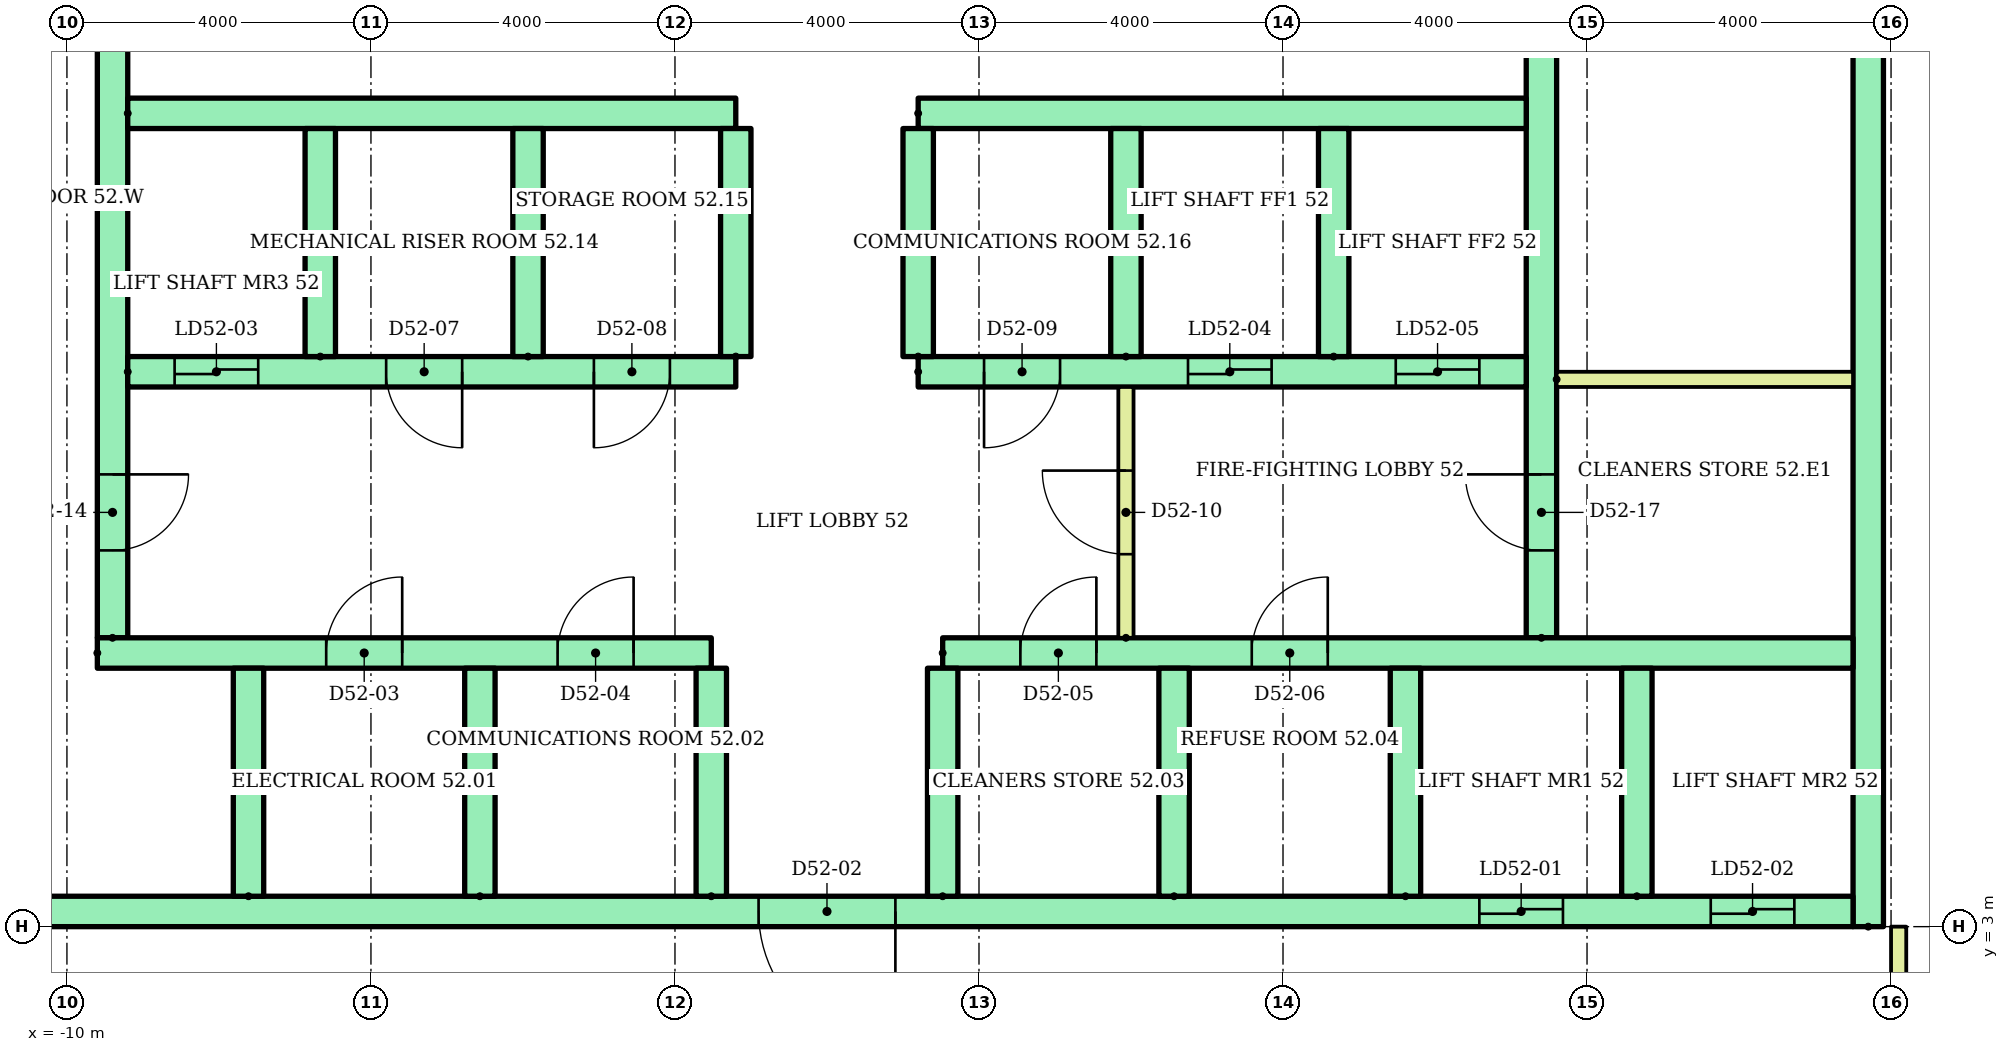
"""IFC4 building model, lengths in metres.
Left out: names, types, materials, properties, quantities, classifications, styles, units other than length and angle.
Written with IfcOpenShell. Run it as: python <this file> out.ifc"""

import sys

from ifc_helpers import new_model, si_unit, direction, frame, frame_2d, origin, place, context, subcontext, project, spatial, rectangle, extrude, element, fill, save


model = new_model("IFC4")
c1 = context("Model", 3, precision=1e-05, world=origin(), true_north=direction((0.0, 1.0)))
c2 = subcontext(c1, "Body", "Model", "MODEL_VIEW")
j1 = project(units=[si_unit("LENGTHUNIT", "METRE"), si_unit("PLANEANGLEUNIT", "RADIAN")], contexts=[c1])
p1 = place(None, origin())
s1 = spatial("IfcSite", under=j1, at=p1, CompositionType="ELEMENT")
p2 = place(p1, origin())
s2 = spatial("IfcBuilding", under=s1, at=p2, CompositionType="ELEMENT")
p3 = place(p2, frame((0.0, 0.0, 203.7)))
s3 = spatial("IfcBuildingStorey", under=s2, at=p3, CompositionType="ELEMENT", Elevation=203.7)
p4 = place(p3, frame((13.7, 3.0, 0.0), z_axis=(0.0, 0.0, 1.0), x_axis=(0.0, 1.0, 0.0)))
e1 = element("IfcWall", 1, at=p4, inside=s3, PredefinedType="SHEAR", context=c2, shape_type="SweptSolid", body=[
    extrude(rectangle(XDim=17.0, YDim=0.4, at=frame_2d((8.5, 0.0))), origin(), (0.0, 0.0, 1.0), 3.62),
])
p5 = place(p3, frame((-9.4, 6.8, 0.0), z_axis=(0.0, 0.0, 1.0), x_axis=(0.0, 1.0, 0.0)))
e2 = element("IfcWall", 2, at=p5, inside=s3, PredefinedType="SHEAR", context=c2, shape_type="SweptSolid", body=[
    extrude(rectangle(XDim=12.7, YDim=0.4, at=frame_2d((6.35, 0.0))), origin(), (0.0, 0.0, 1.0), 3.62),
])
p6 = place(p5, frame((1.15, 0.0, 0.0)))
e3 = element("IfcOpeningElement", 3, at=p6, cuts=e2, PredefinedType="OPENING", context=c2, shape_type="SweptSolid", body=[
    extrude(rectangle(XDim=1.0, YDim=2.1, at=frame_2d((0.5, 1.05))), frame((0.0, 0.21, 0.0), z_axis=(0.0, -1.0, 0.0), x_axis=(1.0, 0.0, 0.0)), (0.0, 0.0, 1.0), 0.42),
])
p7 = place(p5, frame((7.9, 0.0, 0.0)))
e4 = element("IfcOpeningElement", 4, at=p7, cuts=e2, PredefinedType="OPENING", context=c2, shape_type="SweptSolid", body=[
    extrude(rectangle(XDim=1.0, YDim=2.1, at=frame_2d((0.5, 1.05))), frame((0.0, 0.21, 0.0), z_axis=(0.0, -1.0, 0.0), x_axis=(1.0, 0.0, 0.0)), (0.0, 0.0, 1.0), 0.42),
])
p8 = place(p3, frame((9.4, 6.8, 0.0), z_axis=(0.0, 0.0, 1.0), x_axis=(0.0, 1.0, 0.0)))
e5 = element("IfcWall", 5, at=p8, inside=s3, PredefinedType="SHEAR", context=c2, shape_type="SweptSolid", body=[
    extrude(rectangle(XDim=12.7, YDim=0.4, at=frame_2d((6.35, 0.0))), origin(), (0.0, 0.0, 1.0), 3.62),
])
p9 = place(p8, frame((1.15, 0.0, 0.0)))
e6 = element("IfcOpeningElement", 6, at=p9, cuts=e5, PredefinedType="OPENING", context=c2, shape_type="SweptSolid", body=[
    extrude(rectangle(XDim=1.0, YDim=2.1, at=frame_2d((0.5, 1.05))), frame((0.0, 0.21, 0.0), z_axis=(0.0, -1.0, 0.0), x_axis=(1.0, 0.0, 0.0)), (0.0, 0.0, 1.0), 0.42),
])
p10 = place(p8, frame((7.925, 0.0, 0.0)))
e7 = element("IfcOpeningElement", 7, at=p10, cuts=e5, PredefinedType="OPENING", context=c2, shape_type="SweptSolid", body=[
    extrude(rectangle(XDim=1.0, YDim=2.1, at=frame_2d((0.5, 1.05))), frame((0.0, 0.21, 0.0), z_axis=(0.0, -1.0, 0.0), x_axis=(1.0, 0.0, 0.0)), (0.0, 0.0, 1.0), 0.42),
])
p11 = place(p3, frame((-13.5, 3.2, 0.0)))
e8 = element("IfcWall", 8, at=p11, inside=s3, PredefinedType="SHEAR", context=c2, shape_type="SweptSolid", body=[
    extrude(rectangle(XDim=27.0, YDim=0.4, at=frame_2d((13.5, 0.0))), origin(), (0.0, 0.0, 1.0), 3.62),
])
p12 = place(p11, frame((22.083, 0.0, 0.0)))
e9 = element("IfcOpeningElement", 9, at=p12, cuts=e8, PredefinedType="OPENING", context=c2, shape_type="SweptSolid", body=[
    extrude(rectangle(XDim=1.1, YDim=2.1, at=frame_2d((0.55, 1.05))), frame((0.0, 0.21, 0.0), z_axis=(0.0, -1.0, 0.0), x_axis=(1.0, 0.0, 0.0)), (0.0, 0.0, 1.0), 0.42),
])
p13 = place(p11, frame((25.128, 0.0, 0.0)))
e10 = element("IfcOpeningElement", 10, at=p13, cuts=e8, PredefinedType="OPENING", context=c2, shape_type="SweptSolid", body=[
    extrude(rectangle(XDim=1.1, YDim=2.1, at=frame_2d((0.55, 1.05))), frame((0.0, 0.21, 0.0), z_axis=(0.0, -1.0, 0.0), x_axis=(1.0, 0.0, 0.0)), (0.0, 0.0, 1.0), 0.42),
])
p14 = place(p11, frame((12.6, 0.0, 0.0)))
e11 = element("IfcOpeningElement", 11, at=p14, cuts=e8, PredefinedType="OPENING", context=c2, shape_type="SweptSolid", body=[
    extrude(rectangle(XDim=1.8, YDim=2.1, at=frame_2d((0.9, 1.05))), frame((0.0, 0.21, 0.0), z_axis=(0.0, -1.0, 0.0), x_axis=(1.0, 0.0, 0.0)), (0.0, 0.0, 1.0), 0.42),
])
p15 = place(p3, frame((-9.6, 6.6, 0.0)))
e12 = element("IfcWall", 12, at=p15, inside=s3, PredefinedType="SHEAR", context=c2, shape_type="SweptSolid", body=[
    extrude(rectangle(XDim=8.078, YDim=0.4, at=frame_2d((4.039, 0.0))), origin(), (0.0, 0.0, 1.0), 3.62),
])
p16 = place(p15, frame((3.011, 0.0, 0.0)))
e13 = element("IfcOpeningElement", 13, at=p16, cuts=e12, PredefinedType="OPENING", context=c2, shape_type="SweptSolid", body=[
    extrude(rectangle(XDim=1.0, YDim=2.1, at=frame_2d((0.5, 1.05))), frame((0.0, 0.21, 0.0), z_axis=(0.0, -1.0, 0.0), x_axis=(1.0, 0.0, 0.0)), (0.0, 0.0, 1.0), 0.42),
])
p17 = place(p15, frame((6.056, 0.0, 0.0)))
e14 = element("IfcOpeningElement", 14, at=p17, cuts=e12, PredefinedType="OPENING", context=c2, shape_type="SweptSolid", body=[
    extrude(rectangle(XDim=1.0, YDim=2.1, at=frame_2d((0.5, 1.05))), frame((0.0, 0.21, 0.0), z_axis=(0.0, -1.0, 0.0), x_axis=(1.0, 0.0, 0.0)), (0.0, 0.0, 1.0), 0.42),
])
p18 = place(p3, frame((1.522, 6.6, 0.0)))
e15 = element("IfcWall", 15, at=p18, inside=s3, PredefinedType="SHEAR", context=c2, shape_type="SweptSolid", body=[
    extrude(rectangle(XDim=11.978, YDim=0.4, at=frame_2d((5.989, 0.0))), origin(), (0.0, 0.0, 1.0), 3.62),
])
p19 = place(p18, frame((1.022, 0.0, 0.0)))
e16 = element("IfcOpeningElement", 16, at=p19, cuts=e15, PredefinedType="OPENING", context=c2, shape_type="SweptSolid", body=[
    extrude(rectangle(XDim=1.0, YDim=2.1, at=frame_2d((0.5, 1.05))), frame((0.0, 0.21, 0.0), z_axis=(0.0, -1.0, 0.0), x_axis=(1.0, 0.0, 0.0)), (0.0, 0.0, 1.0), 0.42),
])
p20 = place(p18, frame((4.067, 0.0, 0.0)))
e17 = element("IfcOpeningElement", 17, at=p20, cuts=e15, PredefinedType="OPENING", context=c2, shape_type="SweptSolid", body=[
    extrude(rectangle(XDim=1.0, YDim=2.1, at=frame_2d((0.5, 1.05))), frame((0.0, 0.21, 0.0), z_axis=(0.0, -1.0, 0.0), x_axis=(1.0, 0.0, 0.0)), (0.0, 0.0, 1.0), 0.42),
])
for number, where, z_axis, x_axis in (
    (18, (-7.611, 3.4, 0.0), (0.0, 0.0, 1.0), (0.0, 1.0, 0.0)),
    (19, (-4.567, 3.4, 0.0), (0.0, 0.0, 1.0), (0.0, 1.0, 0.0)),
    (20, (-1.522, 3.4, 0.0), (0.0, 0.0, 1.0), (0.0, 1.0, 0.0)),
    (21, (1.522, 3.4, 0.0), (0.0, 0.0, 1.0), (0.0, 1.0, 0.0)),
    (22, (4.567, 3.4, 0.0), (0.0, 0.0, 1.0), (0.0, 1.0, 0.0)),
    (23, (7.611, 3.4, 0.0), (0.0, 0.0, 1.0), (0.0, 1.0, 0.0)),
    (24, (10.656, 3.4, 0.0), (0.0, 0.0, 1.0), (0.0, 1.0, 0.0)),
):
    element("IfcWall", number, at=place(p3, frame(where, z_axis=z_axis, x_axis=x_axis)), inside=s3, PredefinedType="SHEAR", context=c2, shape_type="SweptSolid", body=[
        extrude(rectangle(XDim=3.0, YDim=0.4, at=frame_2d((1.5, 0.0))), origin(), (0.0, 0.0, 1.0), 3.62),
    ])
p21 = place(p3, frame((-9.2, 10.3, 0.0)))
e25 = element("IfcWall", 25, at=p21, inside=s3, PredefinedType="SHEAR", context=c2, shape_type="SweptSolid", body=[
    extrude(rectangle(XDim=8.0, YDim=0.4, at=frame_2d((4.0, 0.0))), origin(), (0.0, 0.0, 1.0), 3.62),
])
p22 = place(p21, frame((0.617, 0.0, 0.0)))
e26 = element("IfcOpeningElement", 26, at=p22, cuts=e25, PredefinedType="OPENING", context=c2, shape_type="SweptSolid", body=[
    extrude(rectangle(XDim=1.1, YDim=2.1, at=frame_2d((0.55, 1.05))), frame((0.0, 0.21, 0.0), z_axis=(0.0, -1.0, 0.0), x_axis=(1.0, 0.0, 0.0)), (0.0, 0.0, 1.0), 0.42),
])
p23 = place(p21, frame((3.4, 0.0, 0.0)))
e27 = element("IfcOpeningElement", 27, at=p23, cuts=e25, PredefinedType="OPENING", context=c2, shape_type="SweptSolid", body=[
    extrude(rectangle(XDim=1.0, YDim=2.1, at=frame_2d((0.5, 1.05))), frame((0.0, 0.21, 0.0), z_axis=(0.0, -1.0, 0.0), x_axis=(1.0, 0.0, 0.0)), (0.0, 0.0, 1.0), 0.42),
])
p24 = place(p21, frame((6.133, 0.0, 0.0)))
e28 = element("IfcOpeningElement", 28, at=p24, cuts=e25, PredefinedType="OPENING", context=c2, shape_type="SweptSolid", body=[
    extrude(rectangle(XDim=1.0, YDim=2.1, at=frame_2d((0.5, 1.05))), frame((0.0, 0.21, 0.0), z_axis=(0.0, -1.0, 0.0), x_axis=(1.0, 0.0, 0.0)), (0.0, 0.0, 1.0), 0.42),
])
p25 = place(p3, frame((-9.2, 13.7, 0.0)))
e29 = element("IfcWall", 29, at=p25, inside=s3, PredefinedType="SHEAR", context=c2, shape_type="SweptSolid", body=[
    extrude(rectangle(XDim=8.0, YDim=0.4, at=frame_2d((4.0, 0.0))), origin(), (0.0, 0.0, 1.0), 3.62),
])
p26 = place(p3, frame((1.2, 10.3, 0.0)))
e30 = element("IfcWall", 30, at=p26, inside=s3, PredefinedType="SHEAR", context=c2, shape_type="SweptSolid", body=[
    extrude(rectangle(XDim=8.0, YDim=0.4, at=frame_2d((4.0, 0.0))), origin(), (0.0, 0.0, 1.0), 3.62),
])
p27 = place(p26, frame((3.55, 0.0, 0.0)))
e31 = element("IfcOpeningElement", 31, at=p27, cuts=e30, PredefinedType="OPENING", context=c2, shape_type="SweptSolid", body=[
    extrude(rectangle(XDim=1.1, YDim=2.1, at=frame_2d((0.55, 1.05))), frame((0.0, 0.21, 0.0), z_axis=(0.0, -1.0, 0.0), x_axis=(1.0, 0.0, 0.0)), (0.0, 0.0, 1.0), 0.42),
])
p28 = place(p26, frame((6.283, 0.0, 0.0)))
e32 = element("IfcOpeningElement", 32, at=p28, cuts=e30, PredefinedType="OPENING", context=c2, shape_type="SweptSolid", body=[
    extrude(rectangle(XDim=1.1, YDim=2.1, at=frame_2d((0.55, 1.05))), frame((0.0, 0.21, 0.0), z_axis=(0.0, -1.0, 0.0), x_axis=(1.0, 0.0, 0.0)), (0.0, 0.0, 1.0), 0.42),
])
p29 = place(p26, frame((0.867, 0.0, 0.0)))
e33 = element("IfcOpeningElement", 33, at=p29, cuts=e30, PredefinedType="OPENING", context=c2, shape_type="SweptSolid", body=[
    extrude(rectangle(XDim=1.0, YDim=2.1, at=frame_2d((0.5, 1.05))), frame((0.0, 0.21, 0.0), z_axis=(0.0, -1.0, 0.0), x_axis=(1.0, 0.0, 0.0)), (0.0, 0.0, 1.0), 0.42),
])
p30 = place(p3, frame((1.2, 13.7, 0.0)))
e34 = element("IfcWall", 34, at=p30, inside=s3, PredefinedType="SHEAR", context=c2, shape_type="SweptSolid", body=[
    extrude(rectangle(XDim=8.0, YDim=0.4, at=frame_2d((4.0, 0.0))), origin(), (0.0, 0.0, 1.0), 3.62),
])
for number, where, z_axis, x_axis in (
    (35, (-6.667, 10.5, 0.0), (0.0, 0.0, 1.0), (0.0, 1.0, 0.0)),
    (36, (-3.933, 10.5, 0.0), (0.0, 0.0, 1.0), (0.0, 1.0, 0.0)),
    (37, (-1.2, 10.5, 0.0), (0.0, 0.0, 1.0), (0.0, 1.0, 0.0)),
    (38, (1.2, 10.5, 0.0), (0.0, 0.0, 1.0), (0.0, 1.0, 0.0)),
    (39, (3.933, 10.5, 0.0), (0.0, 0.0, 1.0), (0.0, 1.0, 0.0)),
    (40, (6.667, 10.5, 0.0), (0.0, 0.0, 1.0), (0.0, 1.0, 0.0)),
):
    element("IfcWall", number, at=place(p3, frame(where, z_axis=z_axis, x_axis=x_axis)), inside=s3, PredefinedType="SHEAR", context=c2, shape_type="SweptSolid", body=[
        extrude(rectangle(XDim=3.0, YDim=0.4, at=frame_2d((1.5, 0.0))), origin(), (0.0, 0.0, 1.0), 3.62),
    ])
p31 = place(p3, frame((3.933, 6.8, 0.0), z_axis=(0.0, 0.0, 1.0), x_axis=(0.0, 1.0, 0.0)))
e41 = element("IfcWall", 41, at=p31, inside=s3, PredefinedType="PARTITIONING", context=c2, shape_type="SweptSolid", body=[
    extrude(rectangle(XDim=3.3, YDim=0.2, at=frame_2d((1.65, 0.0))), origin(), (0.0, 0.0, 1.0), 3.62),
])
p32 = place(p31, frame((1.1, 0.0, 0.0)))
e42 = element("IfcOpeningElement", 42, at=p32, cuts=e41, PredefinedType="OPENING", context=c2, shape_type="SweptSolid", body=[
    extrude(rectangle(XDim=1.1, YDim=2.1, at=frame_2d((0.55, 1.05))), frame((0.0, 0.11, 0.0), z_axis=(0.0, -1.0, 0.0), x_axis=(1.0, 0.0, 0.0)), (0.0, 0.0, 1.0), 0.22),
])
p33 = place(p3, frame((9.6, 10.2, 0.0)))
e43 = element("IfcWall", 43, at=p33, inside=s3, PredefinedType="PARTITIONING", context=c2, shape_type="SweptSolid", body=[
    extrude(rectangle(XDim=3.9, YDim=0.2, at=frame_2d((1.95, 0.0))), origin(), (0.0, 0.0, 1.0), 3.62),
])
p34 = place(p3, frame((14.1, 1.5, 0.0), z_axis=(0.0, 0.0, 1.0), x_axis=(0.0, 1.0, 0.0)))
e44 = element("IfcWall", 44, at=p34, inside=s3, PredefinedType="PARTITIONING", context=c2, shape_type="SweptSolid", body=[
    extrude(rectangle(XDim=1.5, YDim=0.2, at=frame_2d((0.75, 0.0))), origin(), (0.0, 0.0, 1.0), 3.62),
])
p35 = place(p12, origin())
e45 = element("IfcDoor", 45, at=p35, inside=s3, OperationType="SLIDING_TO_LEFT", PredefinedType="DOOR", context=c2, shape_type="SweptSolid", body=[
    extrude(rectangle(XDim=1.1, YDim=2.1, at=frame_2d((0.55, 1.05))), frame((0.0, 0.025, 0.0), z_axis=(0.0, -1.0, 0.0), x_axis=(1.0, 0.0, 0.0)), (0.0, 0.0, 1.0), 0.05),
])
fill(e9, e45)
p36 = place(p13, origin())
e46 = element("IfcDoor", 46, at=p36, inside=s3, OperationType="SLIDING_TO_LEFT", PredefinedType="DOOR", context=c2, shape_type="SweptSolid", body=[
    extrude(rectangle(XDim=1.1, YDim=2.1, at=frame_2d((0.55, 1.05))), frame((0.0, 0.025, 0.0), z_axis=(0.0, -1.0, 0.0), x_axis=(1.0, 0.0, 0.0)), (0.0, 0.0, 1.0), 0.05),
])
fill(e10, e46)
p37 = place(p14, frame((1.8, 0.0, 0.0), z_axis=(0.0, 0.0, 1.0), x_axis=(-1.0, 0.0, 0.0)))
e47 = element("IfcDoor", 47, at=p37, inside=s3, OperationType="DOUBLE_DOOR_SINGLE_SWING", PredefinedType="DOOR", context=c2, shape_type="SweptSolid", body=[
    extrude(rectangle(XDim=1.8, YDim=2.1, at=frame_2d((0.9, 1.05))), frame((0.0, 0.025, 0.0), z_axis=(0.0, -1.0, 0.0), x_axis=(1.0, 0.0, 0.0)), (0.0, 0.0, 1.0), 0.05),
])
fill(e11, e47)
p38 = place(p16, origin())
e48 = element("IfcDoor", 48, at=p38, inside=s3, OperationType="SINGLE_SWING_RIGHT", PredefinedType="DOOR", context=c2, shape_type="SweptSolid", body=[
    extrude(rectangle(XDim=1.0, YDim=2.1, at=frame_2d((0.5, 1.05))), frame((0.0, 0.025, 0.0), z_axis=(0.0, -1.0, 0.0), x_axis=(1.0, 0.0, 0.0)), (0.0, 0.0, 1.0), 0.05),
])
fill(e13, e48)
p39 = place(p17, origin())
e49 = element("IfcDoor", 49, at=p39, inside=s3, OperationType="SINGLE_SWING_RIGHT", PredefinedType="DOOR", context=c2, shape_type="SweptSolid", body=[
    extrude(rectangle(XDim=1.0, YDim=2.1, at=frame_2d((0.5, 1.05))), frame((0.0, 0.025, 0.0), z_axis=(0.0, -1.0, 0.0), x_axis=(1.0, 0.0, 0.0)), (0.0, 0.0, 1.0), 0.05),
])
fill(e14, e49)
p40 = place(p19, origin())
e50 = element("IfcDoor", 50, at=p40, inside=s3, OperationType="SINGLE_SWING_RIGHT", PredefinedType="DOOR", context=c2, shape_type="SweptSolid", body=[
    extrude(rectangle(XDim=1.0, YDim=2.1, at=frame_2d((0.5, 1.05))), frame((0.0, 0.025, 0.0), z_axis=(0.0, -1.0, 0.0), x_axis=(1.0, 0.0, 0.0)), (0.0, 0.0, 1.0), 0.05),
])
fill(e16, e50)
p41 = place(p20, origin())
e51 = element("IfcDoor", 51, at=p41, inside=s3, OperationType="SINGLE_SWING_RIGHT", PredefinedType="DOOR", context=c2, shape_type="SweptSolid", body=[
    extrude(rectangle(XDim=1.0, YDim=2.1, at=frame_2d((0.5, 1.05))), frame((0.0, 0.025, 0.0), z_axis=(0.0, -1.0, 0.0), x_axis=(1.0, 0.0, 0.0)), (0.0, 0.0, 1.0), 0.05),
])
fill(e17, e51)
p42 = place(p22, origin())
e52 = element("IfcDoor", 52, at=p42, inside=s3, OperationType="SLIDING_TO_LEFT", PredefinedType="DOOR", context=c2, shape_type="SweptSolid", body=[
    extrude(rectangle(XDim=1.1, YDim=2.1, at=frame_2d((0.55, 1.05))), frame((0.0, 0.025, 0.0), z_axis=(0.0, -1.0, 0.0), x_axis=(1.0, 0.0, 0.0)), (0.0, 0.0, 1.0), 0.05),
])
fill(e26, e52)
p43 = place(p27, origin())
e53 = element("IfcDoor", 53, at=p43, inside=s3, OperationType="SLIDING_TO_LEFT", PredefinedType="DOOR", context=c2, shape_type="SweptSolid", body=[
    extrude(rectangle(XDim=1.1, YDim=2.1, at=frame_2d((0.55, 1.05))), frame((0.0, 0.025, 0.0), z_axis=(0.0, -1.0, 0.0), x_axis=(1.0, 0.0, 0.0)), (0.0, 0.0, 1.0), 0.05),
])
fill(e31, e53)
p44 = place(p28, origin())
e54 = element("IfcDoor", 54, at=p44, inside=s3, OperationType="SLIDING_TO_LEFT", PredefinedType="DOOR", context=c2, shape_type="SweptSolid", body=[
    extrude(rectangle(XDim=1.1, YDim=2.1, at=frame_2d((0.55, 1.05))), frame((0.0, 0.025, 0.0), z_axis=(0.0, -1.0, 0.0), x_axis=(1.0, 0.0, 0.0)), (0.0, 0.0, 1.0), 0.05),
])
fill(e32, e54)
p45 = place(p23, frame((1.0, 0.0, 0.0), z_axis=(0.0, 0.0, 1.0), x_axis=(-1.0, 0.0, 0.0)))
e55 = element("IfcDoor", 55, at=p45, inside=s3, OperationType="SINGLE_SWING_RIGHT", PredefinedType="DOOR", context=c2, shape_type="SweptSolid", body=[
    extrude(rectangle(XDim=1.0, YDim=2.1, at=frame_2d((0.5, 1.05))), frame((0.0, 0.025, 0.0), z_axis=(0.0, -1.0, 0.0), x_axis=(1.0, 0.0, 0.0)), (0.0, 0.0, 1.0), 0.05),
])
fill(e27, e55)
p46 = place(p24, frame((1.0, 0.0, 0.0), z_axis=(0.0, 0.0, 1.0), x_axis=(-1.0, 0.0, 0.0)))
e56 = element("IfcDoor", 56, at=p46, inside=s3, OperationType="SINGLE_SWING_LEFT", PredefinedType="DOOR", context=c2, shape_type="SweptSolid", body=[
    extrude(rectangle(XDim=1.0, YDim=2.1, at=frame_2d((0.5, 1.05))), frame((0.0, 0.025, 0.0), z_axis=(0.0, -1.0, 0.0), x_axis=(1.0, 0.0, 0.0)), (0.0, 0.0, 1.0), 0.05),
])
fill(e28, e56)
p47 = place(p29, frame((1.0, 0.0, 0.0), z_axis=(0.0, 0.0, 1.0), x_axis=(-1.0, 0.0, 0.0)))
e57 = element("IfcDoor", 57, at=p47, inside=s3, OperationType="SINGLE_SWING_LEFT", PredefinedType="DOOR", context=c2, shape_type="SweptSolid", body=[
    extrude(rectangle(XDim=1.0, YDim=2.1, at=frame_2d((0.5, 1.05))), frame((0.0, 0.025, 0.0), z_axis=(0.0, -1.0, 0.0), x_axis=(1.0, 0.0, 0.0)), (0.0, 0.0, 1.0), 0.05),
])
fill(e33, e57)
p48 = place(p32, origin())
e58 = element("IfcDoor", 58, at=p48, inside=s3, OperationType="SINGLE_SWING_RIGHT", PredefinedType="DOOR", context=c2, shape_type="SweptSolid", body=[
    extrude(rectangle(XDim=1.1, YDim=2.1, at=frame_2d((0.55, 1.05))), frame((0.0, 0.025, 0.0), z_axis=(0.0, -1.0, 0.0), x_axis=(1.0, 0.0, 0.0)), (0.0, 0.0, 1.0), 0.05),
])
fill(e42, e58)
p49 = place(p6, frame((1.0, 0.0, 0.0), z_axis=(0.0, 0.0, 1.0), x_axis=(-1.0, 0.0, 0.0)))
e59 = element("IfcDoor", 59, at=p49, inside=s3, OperationType="SINGLE_SWING_RIGHT", PredefinedType="DOOR", context=c2, shape_type="SweptSolid", body=[
    extrude(rectangle(XDim=1.0, YDim=2.1, at=frame_2d((0.5, 1.05))), frame((0.0, 0.025, 0.0), z_axis=(0.0, -1.0, 0.0), x_axis=(1.0, 0.0, 0.0)), (0.0, 0.0, 1.0), 0.05),
])
fill(e3, e59)
p50 = place(p9, origin())
e60 = element("IfcDoor", 60, at=p50, inside=s3, OperationType="SINGLE_SWING_RIGHT", PredefinedType="DOOR", context=c2, shape_type="SweptSolid", body=[
    extrude(rectangle(XDim=1.0, YDim=2.1, at=frame_2d((0.5, 1.05))), frame((0.0, 0.025, 0.0), z_axis=(0.0, -1.0, 0.0), x_axis=(1.0, 0.0, 0.0)), (0.0, 0.0, 1.0), 0.05),
])
fill(e6, e60)
save(model, sys.argv[1])
